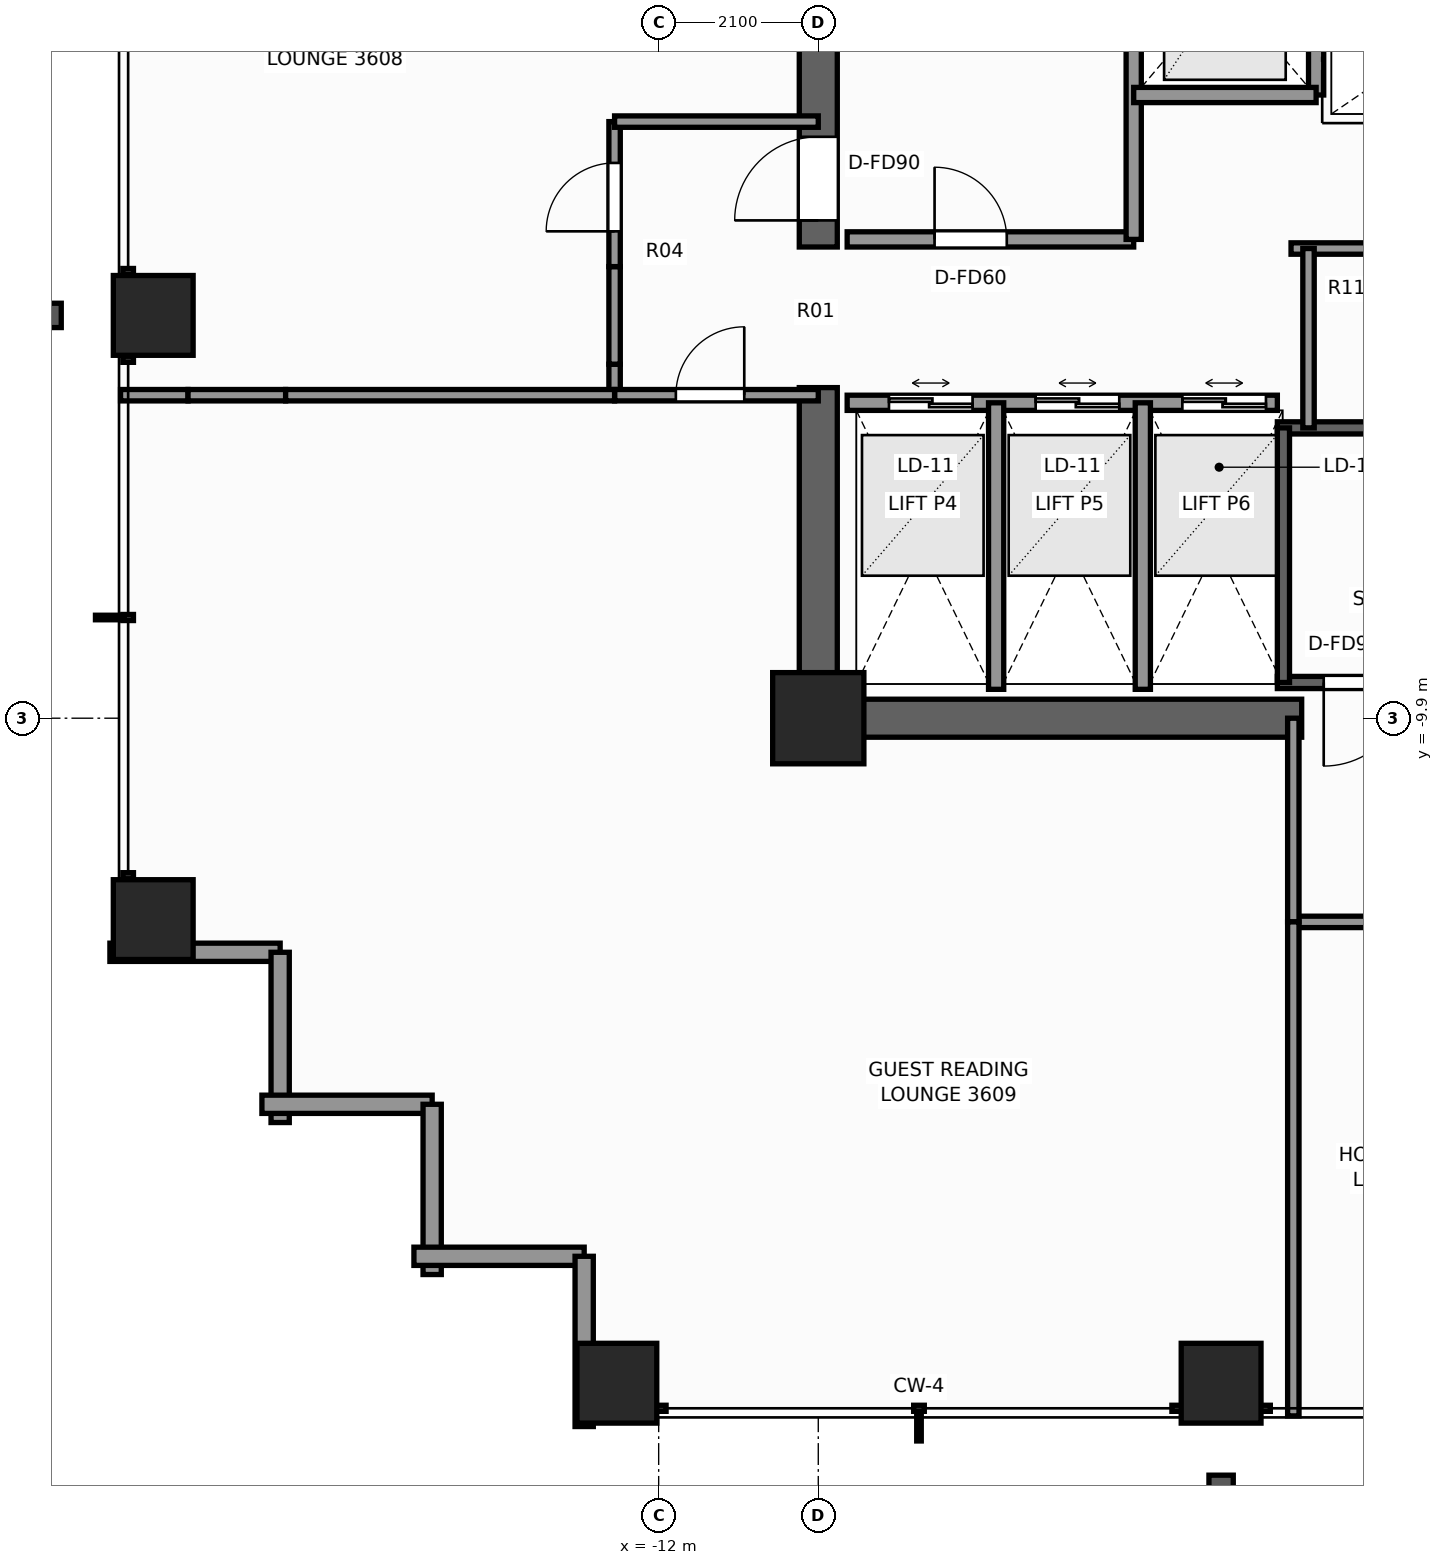
"""IFC4 building model, lengths in metres.
Left out: names, types, materials, properties, quantities, classifications, styles, units other than length and angle.
Written with IfcOpenShell. Run it as: python <this file> out.ifc"""

import sys

from ifc_helpers import new_model, si_unit, direction, frame, frame_2d, origin, origin_2d, place, context, subcontext, project, spatial, rectangle, extrude, element, fill, save


model = new_model("IFC4")
c1 = context("Model", 3, precision=1e-05, world=origin(), true_north=direction((0.0, 1.0)))
c2 = subcontext(c1, "Body", "Model", "MODEL_VIEW")
j1 = project(units=[si_unit("LENGTHUNIT", "METRE"), si_unit("PLANEANGLEUNIT", "RADIAN")], contexts=[c1])
p1 = place(None, origin())
s1 = spatial("IfcSite", under=j1, at=p1, CompositionType="ELEMENT")
p2 = place(p1, origin())
s2 = spatial("IfcBuilding", under=s1, at=p2, CompositionType="ELEMENT")
p3 = place(p2, frame((0.0, 0.0, 125.0)))
s3 = spatial("IfcBuildingStorey", under=s2, at=p3, CompositionType="ELEMENT", Elevation=125.0)
p4 = place(p3, frame((-3.54, -9.9, 0.0), z_axis=(0.0, 0.0, 1.0), x_axis=(-1.0, 0.0, 0.0)))
e1 = element("IfcWall", 1, at=p4, inside=s3, PredefinedType="SHEAR", context=c2, shape_type="SweptSolid", body=[
    extrude(rectangle(XDim=6.61, YDim=0.5, at=frame_2d((3.305, 0.0))), origin(), (0.0, 0.0, 1.0), 3.3),
])
p5 = place(p3, frame((-9.9, -9.65, 0.0), z_axis=(0.0, 0.0, 1.0), x_axis=(0.0, 1.0, 0.0)))
e2 = element("IfcWall", 2, at=p5, inside=s3, PredefinedType="SHEAR", context=c2, shape_type="SweptSolid", body=[
    extrude(rectangle(XDim=4.1, YDim=0.5, at=frame_2d((2.05, 0.0))), origin(), (0.0, 0.0, 1.0), 3.3),
])
p6 = place(p3, frame((-9.9, -3.7, 0.0), z_axis=(0.0, 0.0, 1.0), x_axis=(0.0, 1.0, 0.0)))
e3 = element("IfcWall", 3, at=p6, inside=s3, PredefinedType="SHEAR", context=c2, shape_type="SweptSolid", body=[
    extrude(rectangle(XDim=13.35, YDim=0.5, at=frame_2d((6.675, 0.0))), origin(), (0.0, 0.0, 1.0), 3.3),
])
p7 = place(p6, frame((0.35, 0.0, 0.0)))
e4 = element("IfcOpeningElement", 4, at=p7, cuts=e3, PredefinedType="OPENING", context=c2, shape_type="SweptSolid", body=[
    extrude(rectangle(XDim=1.1, YDim=2.2, at=frame_2d((0.55, 1.1))), frame((0.0, 0.26, 0.0), z_axis=(0.0, -1.0, 0.0), x_axis=(1.0, 0.0, 0.0)), (0.0, 0.0, 1.0), 0.52),
])
p8 = place(p3, frame((-9.9, -9.9, 0.0), z_axis=(0.0, 0.0, 1.0), x_axis=(1.0, 0.0, 0.0)))
e5 = element("IfcColumn", 5, at=p8, inside=s3, PredefinedType="COLUMN", context=c2, shape_type="SweptSolid", body=[
    extrude(rectangle(XDim=1.2, YDim=1.2, at=origin_2d()), origin(), (0.0, 0.0, 1.0), 3.3),
])
for number, where, z_axis, x_axis in (
    (6, (-12.55, -18.65, 0.0), (0.0, 0.0, 1.0), (1.0, 0.0, 0.0)),
    (7, (-4.6, -18.65, 0.0), (0.0, 0.0, 1.0), (1.0, 0.0, 0.0)),
    (8, (-18.65, -12.55, 0.0), (0.0, 0.0, 1.0), (1.0, 0.0, 0.0)),
    (9, (-18.65, -4.6, 0.0), (0.0, 0.0, 1.0), (1.0, 0.0, 0.0)),
):
    element("IfcColumn", number, at=place(p3, frame(where, z_axis=z_axis, x_axis=x_axis)), inside=s3, PredefinedType="COLUMN", context=c2, shape_type="SweptSolid", body=[
        extrude(rectangle(XDim=1.05, YDim=1.05, at=origin_2d()), origin(), (0.0, 0.0, 1.0), 3.3),
    ])
for number, where, z_axis, x_axis in (
    (10, (-16.98, -12.98, 0.0), (0.0, 0.0, 1.0), (-1.0, 0.0, 0.0)),
    (11, (-16.98, -15.22, 0.0), (0.0, 0.0, 1.0), (0.0, 1.0, 0.0)),
    (12, (-14.98, -14.98, 0.0), (0.0, 0.0, 1.0), (-1.0, 0.0, 0.0)),
    (13, (-14.98, -17.22, 0.0), (0.0, 0.0, 1.0), (0.0, 1.0, 0.0)),
    (14, (-12.98, -16.98, 0.0), (0.0, 0.0, 1.0), (-1.0, 0.0, 0.0)),
    (15, (-12.98, -19.22, 0.0), (0.0, 0.0, 1.0), (0.0, 1.0, 0.0)),
):
    element("IfcWall", number, at=place(p3, frame(where, z_axis=z_axis, x_axis=x_axis)), inside=s3, PredefinedType="STANDARD", context=c2, shape_type="SweptSolid", body=[
        extrude(rectangle(XDim=2.24, YDim=0.24, at=frame_2d((1.12, 0.0))), origin(), (0.0, 0.0, 1.0), 1.295),
    ])
p9 = place(p3, frame((3.86, -9.43, 0.0), z_axis=(0.0, 0.0, 1.0), x_axis=(-1.0, 0.0, 0.0)))
e16 = element("IfcWall", 16, at=p9, inside=s3, PredefinedType="SHEAR", context=c2, shape_type="SweptSolid", body=[
    extrude(rectangle(XDim=7.72, YDim=0.16, at=frame_2d((3.86, 0.0))), origin(), (0.0, 0.0, 1.0), 3.3),
])
p10 = place(p9, frame((6.01, 0.0, 0.0)))
e17 = element("IfcOpeningElement", 17, at=p10, cuts=e16, PredefinedType="OPENING", context=c2, shape_type="SweptSolid", body=[
    extrude(rectangle(XDim=1.1, YDim=2.2, at=frame_2d((0.55, 1.1))), frame((0.0, 0.09, 0.0), z_axis=(0.0, -1.0, 0.0), x_axis=(1.0, 0.0, 0.0)), (0.0, 0.0, 1.0), 0.18),
])
p11 = place(p3, frame((-3.86, -6.08, 0.0), z_axis=(0.0, 0.0, 1.0), x_axis=(1.0, 0.0, 0.0)))
e18 = element("IfcWall", 18, at=p11, inside=s3, PredefinedType="SHEAR", context=c2, shape_type="SweptSolid", body=[
    extrude(rectangle(XDim=7.72, YDim=0.16, at=frame_2d((3.86, 0.0))), origin(), (0.0, 0.0, 1.0), 3.3),
])
p12 = place(p3, frame((-3.78, -9.43, 0.0), z_axis=(0.0, 0.0, 1.0), x_axis=(0.0, 1.0, 0.0)))
e19 = element("IfcWall", 19, at=p12, inside=s3, PredefinedType="SHEAR", context=c2, shape_type="SweptSolid", body=[
    extrude(rectangle(XDim=3.35, YDim=0.16, at=frame_2d((1.675, 0.0))), origin(), (0.0, 0.0, 1.0), 3.3),
])
p13 = place(p3, frame((-9.52, -3.6, 0.0), z_axis=(0.0, 0.0, 1.0), x_axis=(1.0, 0.0, 0.0)))
e20 = element("IfcWall", 20, at=p13, inside=s3, PredefinedType="SOLIDWALL", context=c2, shape_type="SweptSolid", body=[
    extrude(rectangle(XDim=3.77, YDim=0.2, at=frame_2d((1.885, 0.0))), origin(), (0.0, 0.0, 1.0), 3.1),
])
p14 = place(p13, frame((1.15, 0.0, 0.0)))
e21 = element("IfcOpeningElement", 21, at=p14, cuts=e20, PredefinedType="OPENING", context=c2, shape_type="SweptSolid", body=[
    extrude(rectangle(XDim=0.95, YDim=2.06, at=frame_2d((0.475, 1.03))), frame((0.0, 0.11, 0.0), z_axis=(0.0, -1.0, 0.0), x_axis=(1.0, 0.0, 0.0)), (0.0, 0.0, 1.0), 0.22),
])
p15 = place(p3, frame((-5.75, -3.6, 0.0), z_axis=(0.0, 0.0, 1.0), x_axis=(0.0, 1.0, 0.0)))
e22 = element("IfcWall", 22, at=p15, inside=s3, PredefinedType="SOLIDWALL", context=c2, shape_type="SweptSolid", body=[
    extrude(rectangle(XDim=5.57, YDim=0.2, at=frame_2d((2.785, 0.0))), origin(), (0.0, 0.0, 1.0), 2.735),
])
p16 = place(p15, frame((2.75, 0.0, 0.0)))
e23 = element("IfcOpeningElement", 23, at=p16, cuts=e22, PredefinedType="OPENING", context=c2, shape_type="SweptSolid", body=[
    extrude(rectangle(XDim=1.1, YDim=2.2, at=frame_2d((0.55, 1.1))), frame((0.0, 0.11, 0.0), z_axis=(0.0, -1.0, 0.0), x_axis=(1.0, 0.0, 0.0)), (0.0, 0.0, 1.0), 0.22),
])
p17 = place(p3, frame((-3.35, -1.7, 0.0), z_axis=(0.0, 0.0, 1.0), x_axis=(0.0, 1.0, 0.0)))
e24 = element("IfcWall", 24, at=p17, inside=s3, PredefinedType="SOLIDWALL", context=c2, shape_type="SweptSolid", body=[
    extrude(rectangle(XDim=2.8, YDim=0.2, at=frame_2d((1.4, 0.0))), origin(), (0.0, 0.0, 1.0), 2.735),
])
p18 = place(p3, frame((-5.75, -1.7, 0.0), z_axis=(0.0, 0.0, 1.0), x_axis=(1.0, 0.0, 0.0)))
e25 = element("IfcWall", 25, at=p18, inside=s3, PredefinedType="SOLIDWALL", context=c2, shape_type="SweptSolid", body=[
    extrude(rectangle(XDim=2.4, YDim=0.2, at=frame_2d((1.2, 0.0))), origin(), (0.0, 0.0, 1.0), 3.1),
])
p19 = place(p3, frame((-9.52, -5.75, 0.0), z_axis=(0.0, 0.0, 1.0), x_axis=(1.0, 0.0, 0.0)))
e26 = element("IfcWall", 26, at=p19, inside=s3, PredefinedType="SOLIDWALL", context=c2, shape_type="SweptSolid", body=[
    extrude(rectangle(XDim=5.66, YDim=0.2, at=frame_2d((2.83, 0.0))), origin(), (0.0, 0.0, 1.0), 3.1),
])
p20 = place(p19, frame((0.55, 0.0, 0.0)))
e27 = element("IfcOpeningElement", 27, at=p20, cuts=e26, PredefinedType="OPENING", context=c2, shape_type="SweptSolid", body=[
    extrude(rectangle(XDim=1.1, YDim=2.2, at=frame_2d((0.55, 1.1))), frame((0.0, 0.11, 0.0), z_axis=(0.0, -1.0, 0.0), x_axis=(1.0, 0.0, 0.0)), (0.0, 0.0, 1.0), 0.22),
])
p21 = place(p19, frame((2.48, 0.0, 0.0)))
e28 = element("IfcOpeningElement", 28, at=p21, cuts=e26, PredefinedType="OPENING", context=c2, shape_type="SweptSolid", body=[
    extrude(rectangle(XDim=1.1, YDim=2.2, at=frame_2d((0.55, 1.1))), frame((0.0, 0.11, 0.0), z_axis=(0.0, -1.0, 0.0), x_axis=(1.0, 0.0, 0.0)), (0.0, 0.0, 1.0), 0.22),
])
p22 = place(p19, frame((4.41, 0.0, 0.0)))
e29 = element("IfcOpeningElement", 29, at=p22, cuts=e26, PredefinedType="OPENING", context=c2, shape_type="SweptSolid", body=[
    extrude(rectangle(XDim=1.1, YDim=2.2, at=frame_2d((0.55, 1.1))), frame((0.0, 0.11, 0.0), z_axis=(0.0, -1.0, 0.0), x_axis=(1.0, 0.0, 0.0)), (0.0, 0.0, 1.0), 0.22),
])
for number, where, z_axis, x_axis in (
    (30, (-7.56, -9.52, 0.0), (0.0, 0.0, 1.0), (0.0, 1.0, 0.0)),
    (31, (-5.63, -9.52, 0.0), (0.0, 0.0, 1.0), (0.0, 1.0, 0.0)),
):
    element("IfcWall", number, at=place(p3, frame(where, z_axis=z_axis, x_axis=x_axis)), inside=s3, PredefinedType="SOLIDWALL", context=c2, shape_type="SweptSolid", body=[
        extrude(rectangle(XDim=3.77, YDim=0.2, at=frame_2d((1.885, 0.0))), origin(), (0.0, 0.0, 1.0), 3.1),
    ])
p23 = place(p3, frame((-3.68, -3.72, 0.0), z_axis=(0.0, 0.0, 1.0), x_axis=(1.0, 0.0, 0.0)))
e32 = element("IfcWall", 32, at=p23, inside=s3, PredefinedType="PARTITIONING", context=c2, shape_type="SweptSolid", body=[
    extrude(rectangle(XDim=7.36, YDim=0.15, at=frame_2d((3.68, 0.0))), origin(), (0.0, 0.0, 1.0), 3.1),
])
p24 = place(p3, frame((-3.45, -6.08, 0.0), z_axis=(0.0, 0.0, 1.0), x_axis=(0.0, 1.0, 0.0)))
e33 = element("IfcWall", 33, at=p24, inside=s3, PredefinedType="PARTITIONING", context=c2, shape_type="SweptSolid", body=[
    extrude(rectangle(XDim=2.36, YDim=0.15, at=frame_2d((1.18, 0.0))), origin(), (0.0, 0.0, 1.0), 3.1),
])
p25 = place(p3, frame((-3.65, -12.58, 0.0), z_axis=(0.0, 0.0, 1.0), x_axis=(1.0, 0.0, 0.0)))
e34 = element("IfcWall", 34, at=p25, inside=s3, PredefinedType="PARTITIONING", context=c2, shape_type="SweptSolid", body=[
    extrude(rectangle(XDim=7.608, YDim=0.15, at=frame_2d((3.804, 0.0))), origin(), (0.0, 0.0, 1.0), 2.625),
])
p26 = place(p25, frame((1.224, 0.0, 0.0)))
e35 = element("IfcOpeningElement", 35, at=p26, cuts=e34, PredefinedType="OPENING", context=c2, shape_type="SweptSolid", body=[
    extrude(rectangle(XDim=0.9, YDim=2.06, at=frame_2d((0.45, 1.03))), frame((0.0, 0.085, 0.0), z_axis=(0.0, -1.0, 0.0), x_axis=(1.0, 0.0, 0.0)), (0.0, 0.0, 1.0), 0.17),
])
p27 = place(p25, frame((5.205, 0.0, 0.0)))
e36 = element("IfcOpeningElement", 36, at=p27, cuts=e34, PredefinedType="OPENING", context=c2, shape_type="SweptSolid", body=[
    extrude(rectangle(XDim=0.95, YDim=2.06, at=frame_2d((0.475, 1.03))), frame((0.0, 0.085, 0.0), z_axis=(0.0, -1.0, 0.0), x_axis=(1.0, 0.0, 0.0)), (0.0, 0.0, 1.0), 0.17),
])
p28 = place(p3, frame((-3.65, -12.58, 0.0), z_axis=(0.0, 0.0, 1.0), x_axis=(0.0, 1.0, 0.0)))
e37 = element("IfcWall", 37, at=p28, inside=s3, PredefinedType="PARTITIONING", context=c2, shape_type="SweptSolid", body=[
    extrude(rectangle(XDim=2.68, YDim=0.15, at=frame_2d((1.34, 0.0))), origin(), (0.0, 0.0, 1.0), 3.1),
])
p29 = place(p3, frame((-12.58, -5.65, 0.0), z_axis=(0.0, 0.0, 1.0), x_axis=(0.0, 1.0, 0.0)))
e38 = element("IfcWall", 38, at=p29, inside=s3, PredefinedType="PARTITIONING", context=c2, shape_type="SweptSolid", body=[
    extrude(rectangle(XDim=0.408, YDim=0.15, at=frame_2d((0.204, 0.0))), origin(), (0.0, 0.0, 1.0), 3.1),
])
p30 = place(p3, frame((-12.58, -5.242, 0.0), z_axis=(0.0, 0.0, 1.0), x_axis=(0.0, 1.0, 0.0)))
e39 = element("IfcWall", 39, at=p30, inside=s3, PredefinedType="PARTITIONING", context=c2, shape_type="SweptSolid", body=[
    extrude(rectangle(XDim=1.284, YDim=0.15, at=frame_2d((0.642, 0.0))), origin(), (0.0, 0.0, 1.0), 1.285),
])
p31 = place(p3, frame((-12.58, -3.958, 0.0), z_axis=(0.0, 0.0, 1.0), x_axis=(0.0, 1.0, 0.0)))
e40 = element("IfcWall", 40, at=p31, inside=s3, PredefinedType="PARTITIONING", context=c2, shape_type="SweptSolid", body=[
    extrude(rectangle(XDim=1.908, YDim=0.15, at=frame_2d((0.954, 0.0))), origin(), (0.0, 0.0, 1.0), 2.389),
])
p32 = place(p31, frame((0.464, 0.0, 0.0)))
e41 = element("IfcOpeningElement", 41, at=p32, cuts=e40, PredefinedType="OPENING", context=c2, shape_type="SweptSolid", body=[
    extrude(rectangle(XDim=0.9, YDim=2.06, at=frame_2d((0.45, 1.03))), frame((0.0, 0.085, 0.0), z_axis=(0.0, -1.0, 0.0), x_axis=(1.0, 0.0, 0.0)), (0.0, 0.0, 1.0), 0.17),
])
p33 = place(p3, frame((-12.58, -2.05, 0.0), z_axis=(0.0, 0.0, 1.0), x_axis=(1.0, 0.0, 0.0)))
e42 = element("IfcWall", 42, at=p33, inside=s3, PredefinedType="PARTITIONING", context=c2, shape_type="SweptSolid", body=[
    extrude(rectangle(XDim=2.68, YDim=0.15, at=frame_2d((1.34, 0.0))), origin(), (0.0, 0.0, 1.0), 3.1),
])
p34 = place(p3, frame((-12.58, -5.65, 0.0), z_axis=(0.0, 0.0, 1.0), x_axis=(1.0, 0.0, 0.0)))
e43 = element("IfcWall", 43, at=p34, inside=s3, PredefinedType="PARTITIONING", context=c2, shape_type="SweptSolid", body=[
    extrude(rectangle(XDim=2.68, YDim=0.15, at=frame_2d((1.34, 0.0))), origin(), (0.0, 0.0, 1.0), 3.1),
])
p35 = place(p34, frame((0.806, 0.0, 0.0)))
e44 = element("IfcOpeningElement", 44, at=p35, cuts=e43, PredefinedType="OPENING", context=c2, shape_type="SweptSolid", body=[
    extrude(rectangle(XDim=0.9, YDim=2.06, at=frame_2d((0.45, 1.03))), frame((0.0, 0.085, 0.0), z_axis=(0.0, -1.0, 0.0), x_axis=(1.0, 0.0, 0.0)), (0.0, 0.0, 1.0), 0.17),
])
p36 = place(p3, frame((-19.08, -5.65, 0.0), z_axis=(0.0, 0.0, 1.0), x_axis=(1.0, 0.0, 0.0)))
e45 = element("IfcWall", 45, at=p36, inside=s3, PredefinedType="PARTITIONING", context=c2, shape_type="SweptSolid", body=[
    extrude(rectangle(XDim=0.888, YDim=0.15, at=frame_2d((0.444, 0.0))), origin(), (0.0, 0.0, 1.0), 2.469),
])
p37 = place(p3, frame((-18.192, -5.65, 0.0), z_axis=(0.0, 0.0, 1.0), x_axis=(1.0, 0.0, 0.0)))
e46 = element("IfcWall", 46, at=p37, inside=s3, PredefinedType="PARTITIONING", context=c2, shape_type="SweptSolid", body=[
    extrude(rectangle(XDim=1.284, YDim=0.15, at=frame_2d((0.642, 0.0))), origin(), (0.0, 0.0, 1.0), 1.285),
])
p38 = place(p3, frame((-16.908, -5.65, 0.0), z_axis=(0.0, 0.0, 1.0), x_axis=(1.0, 0.0, 0.0)))
e47 = element("IfcWall", 47, at=p38, inside=s3, PredefinedType="PARTITIONING", context=c2, shape_type="SweptSolid", body=[
    extrude(rectangle(XDim=4.328, YDim=0.15, at=frame_2d((2.164, 0.0))), origin(), (0.0, 0.0, 1.0), 3.1),
])
p39 = place(p3, frame((-3.65, -19.08, 0.0), z_axis=(0.0, 0.0, 1.0), x_axis=(0.0, 1.0, 0.0)))
e48 = element("IfcWall", 48, at=p39, inside=s3, PredefinedType="PARTITIONING", context=c2, shape_type="SweptSolid", body=[
    extrude(rectangle(XDim=6.5, YDim=0.15, at=frame_2d((3.25, 0.0))), origin(), (0.0, 0.0, 1.0), 2.469),
])
p40 = place(p10, origin())
e49 = element("IfcDoor", 49, at=p40, inside=s3, OperationType="SINGLE_SWING_RIGHT", PredefinedType="DOOR", context=c2, shape_type="SweptSolid", body=[
    extrude(rectangle(XDim=1.1, YDim=2.2, at=frame_2d((0.55, 1.1))), frame((0.0, 0.025, 0.0), z_axis=(0.0, -1.0, 0.0), x_axis=(1.0, 0.0, 0.0)), (0.0, 0.0, 1.0), 0.05),
])
fill(e17, e49)
p41 = place(p7, origin())
e50 = element("IfcDoor", 50, at=p41, inside=s3, OperationType="SINGLE_SWING_LEFT", PredefinedType="DOOR", context=c2, shape_type="SweptSolid", body=[
    extrude(rectangle(XDim=1.1, YDim=2.2, at=frame_2d((0.55, 1.1))), frame((0.0, 0.025, 0.0), z_axis=(0.0, -1.0, 0.0), x_axis=(1.0, 0.0, 0.0)), (0.0, 0.0, 1.0), 0.05),
])
fill(e4, e50)
p42 = place(p20, origin())
e51 = element("IfcDoor", 51, at=p42, inside=s3, OperationType="DOUBLE_DOOR_SLIDING", PredefinedType="DOOR", context=c2, shape_type="SweptSolid", body=[
    extrude(rectangle(XDim=1.1, YDim=2.2, at=frame_2d((0.55, 1.1))), frame((0.0, 0.025, 0.0), z_axis=(0.0, -1.0, 0.0), x_axis=(1.0, 0.0, 0.0)), (0.0, 0.0, 1.0), 0.05),
])
fill(e27, e51)
p43 = place(p21, origin())
e52 = element("IfcDoor", 52, at=p43, inside=s3, OperationType="DOUBLE_DOOR_SLIDING", PredefinedType="DOOR", context=c2, shape_type="SweptSolid", body=[
    extrude(rectangle(XDim=1.1, YDim=2.2, at=frame_2d((0.55, 1.1))), frame((0.0, 0.025, 0.0), z_axis=(0.0, -1.0, 0.0), x_axis=(1.0, 0.0, 0.0)), (0.0, 0.0, 1.0), 0.05),
])
fill(e28, e52)
p44 = place(p22, origin())
e53 = element("IfcDoor", 53, at=p44, inside=s3, OperationType="DOUBLE_DOOR_SLIDING", PredefinedType="DOOR", context=c2, shape_type="SweptSolid", body=[
    extrude(rectangle(XDim=1.1, YDim=2.2, at=frame_2d((0.55, 1.1))), frame((0.0, 0.025, 0.0), z_axis=(0.0, -1.0, 0.0), x_axis=(1.0, 0.0, 0.0)), (0.0, 0.0, 1.0), 0.05),
])
fill(e29, e53)
p45 = place(p14, origin())
e54 = element("IfcDoor", 54, at=p45, inside=s3, OperationType="SINGLE_SWING_LEFT", PredefinedType="DOOR", context=c2, shape_type="SweptSolid", body=[
    extrude(rectangle(XDim=0.95, YDim=2.06, at=frame_2d((0.475, 1.03))), frame((0.0, 0.025, 0.0), z_axis=(0.0, -1.0, 0.0), x_axis=(1.0, 0.0, 0.0)), (0.0, 0.0, 1.0), 0.05),
])
fill(e21, e54)
p46 = place(p32, origin())
e55 = element("IfcDoor", 55, at=p46, inside=s3, OperationType="SINGLE_SWING_LEFT", PredefinedType="DOOR", context=c2, shape_type="SweptSolid", body=[
    extrude(rectangle(XDim=0.9, YDim=2.06, at=frame_2d((0.45, 1.03))), frame((0.0, 0.025, 0.0), z_axis=(0.0, -1.0, 0.0), x_axis=(1.0, 0.0, 0.0)), (0.0, 0.0, 1.0), 0.05),
])
fill(e41, e55)
p47 = place(p35, origin())
e56 = element("IfcDoor", 56, at=p47, inside=s3, OperationType="SINGLE_SWING_RIGHT", PredefinedType="DOOR", context=c2, shape_type="SweptSolid", body=[
    extrude(rectangle(XDim=0.9, YDim=2.06, at=frame_2d((0.45, 1.03))), frame((0.0, 0.025, 0.0), z_axis=(0.0, -1.0, 0.0), x_axis=(1.0, 0.0, 0.0)), (0.0, 0.0, 1.0), 0.05),
])
fill(e44, e56)
save(model, sys.argv[1])
